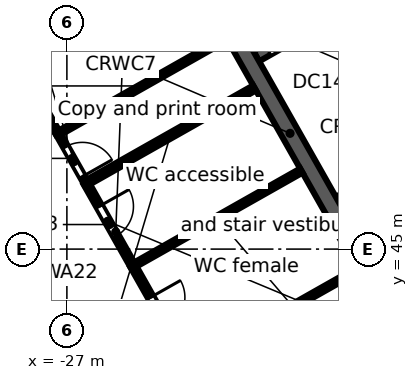
"""IFC4 building model, lengths in metres.
Left out: names, types, materials, properties, quantities, classifications, styles, units other than length and angle.
Written with IfcOpenShell. Run it as: python <this file> out.ifc"""

import sys

from ifc_helpers import new_model, si_unit, direction, frame, frame_2d, origin, place, context, subcontext, project, spatial, rectangle, extrude, element, fill, save


model = new_model("IFC4")
c1 = context("Model", 3, precision=1e-05, world=origin(), true_north=direction((0.0, 1.0)))
c2 = subcontext(c1, "Body", "Model", "MODEL_VIEW")
j1 = project(units=[si_unit("LENGTHUNIT", "METRE"), si_unit("PLANEANGLEUNIT", "RADIAN")], contexts=[c1])
p1 = place(None, origin())
s1 = spatial("IfcSite", under=j1, at=p1, CompositionType="ELEMENT")
p2 = place(p1, origin())
s2 = spatial("IfcBuilding", under=s1, at=p2, CompositionType="ELEMENT")
p3 = place(p2, frame((0.0, 0.0, 219.2)))
s3 = spatial("IfcBuildingStorey", under=s2, at=p3, CompositionType="ELEMENT", Elevation=219.2)
p4 = place(p3, frame((-0.046, 47.974, 0.0), z_axis=(0.0, 0.0, 1.0), x_axis=(-0.870356579543, -0.492421998337, 0.0)))
e1 = element("IfcWall", 1, at=p4, inside=s3, PredefinedType="STANDARD", context=c2, shape_type="SweptSolid", body=[
    extrude(rectangle(XDim=43.754, YDim=0.25, at=frame_2d((21.877, 0.0))), origin(), (0.0, 0.0, 1.0), 3.62),
])
p5 = place(p4, frame((41.061, 0.0, 0.8)))
e2 = element("IfcOpeningElement", 2, at=p5, cuts=e1, PredefinedType="OPENING", context=c2, shape_type="SweptSolid", body=[
    extrude(rectangle(XDim=2.4, YDim=2.2, at=frame_2d((1.2, 1.1))), frame((0.0, 0.135, 0.0), z_axis=(0.0, -1.0, 0.0), x_axis=(1.0, 0.0, 0.0)), (0.0, 0.0, 1.0), 0.27),
])
p6 = place(p4, frame((38.443, 0.0, 0.0)))
e3 = element("IfcOpeningElement", 3, at=p6, cuts=e1, PredefinedType="OPENING", context=c2, shape_type="SweptSolid", body=[
    extrude(rectangle(XDim=1.8, YDim=2.4, at=frame_2d((0.9, 1.2))), frame((0.0, 0.135, 0.0), z_axis=(0.0, -1.0, 0.0), x_axis=(1.0, 0.0, 0.0)), (0.0, 0.0, 1.0), 0.27),
])
p7 = place(p4, frame((35.225, 0.0, 0.8)))
e4 = element("IfcOpeningElement", 4, at=p7, cuts=e1, PredefinedType="OPENING", context=c2, shape_type="SweptSolid", body=[
    extrude(rectangle(XDim=2.4, YDim=2.2, at=frame_2d((1.2, 1.1))), frame((0.0, 0.135, 0.0), z_axis=(0.0, -1.0, 0.0), x_axis=(1.0, 0.0, 0.0)), (0.0, 0.0, 1.0), 0.27),
])
p8 = place(p4, frame((32.307, 0.0, 0.8)))
e5 = element("IfcOpeningElement", 5, at=p8, cuts=e1, PredefinedType="OPENING", context=c2, shape_type="SweptSolid", body=[
    extrude(rectangle(XDim=2.4, YDim=2.2, at=frame_2d((1.2, 1.1))), frame((0.0, 0.135, 0.0), z_axis=(0.0, -1.0, 0.0), x_axis=(1.0, 0.0, 0.0)), (0.0, 0.0, 1.0), 0.27),
])
p9 = place(p4, frame((29.688, 0.0, 0.0)))
e6 = element("IfcOpeningElement", 6, at=p9, cuts=e1, PredefinedType="OPENING", context=c2, shape_type="SweptSolid", body=[
    extrude(rectangle(XDim=1.8, YDim=2.4, at=frame_2d((0.9, 1.2))), frame((0.0, 0.135, 0.0), z_axis=(0.0, -1.0, 0.0), x_axis=(1.0, 0.0, 0.0)), (0.0, 0.0, 1.0), 0.27),
])
p10 = place(p4, frame((26.47, 0.0, 0.8)))
e7 = element("IfcOpeningElement", 7, at=p10, cuts=e1, PredefinedType="OPENING", context=c2, shape_type="SweptSolid", body=[
    extrude(rectangle(XDim=2.4, YDim=2.2, at=frame_2d((1.2, 1.1))), frame((0.0, 0.135, 0.0), z_axis=(0.0, -1.0, 0.0), x_axis=(1.0, 0.0, 0.0)), (0.0, 0.0, 1.0), 0.27),
])
p11 = place(p4, frame((23.552, 0.0, 0.8)))
e8 = element("IfcOpeningElement", 8, at=p11, cuts=e1, PredefinedType="OPENING", context=c2, shape_type="SweptSolid", body=[
    extrude(rectangle(XDim=2.4, YDim=2.2, at=frame_2d((1.2, 1.1))), frame((0.0, 0.135, 0.0), z_axis=(0.0, -1.0, 0.0), x_axis=(1.0, 0.0, 0.0)), (0.0, 0.0, 1.0), 0.27),
])
p12 = place(p4, frame((20.934, 0.0, 0.0)))
e9 = element("IfcOpeningElement", 9, at=p12, cuts=e1, PredefinedType="OPENING", context=c2, shape_type="SweptSolid", body=[
    extrude(rectangle(XDim=1.8, YDim=2.4, at=frame_2d((0.9, 1.2))), frame((0.0, 0.135, 0.0), z_axis=(0.0, -1.0, 0.0), x_axis=(1.0, 0.0, 0.0)), (0.0, 0.0, 1.0), 0.27),
])
p13 = place(p4, frame((17.716, 0.0, 0.8)))
e10 = element("IfcOpeningElement", 10, at=p13, cuts=e1, PredefinedType="OPENING", context=c2, shape_type="SweptSolid", body=[
    extrude(rectangle(XDim=2.4, YDim=2.2, at=frame_2d((1.2, 1.1))), frame((0.0, 0.135, 0.0), z_axis=(0.0, -1.0, 0.0), x_axis=(1.0, 0.0, 0.0)), (0.0, 0.0, 1.0), 0.27),
])
p14 = place(p4, frame((14.798, 0.0, 0.8)))
e11 = element("IfcOpeningElement", 11, at=p14, cuts=e1, PredefinedType="OPENING", context=c2, shape_type="SweptSolid", body=[
    extrude(rectangle(XDim=2.4, YDim=2.2, at=frame_2d((1.2, 1.1))), frame((0.0, 0.135, 0.0), z_axis=(0.0, -1.0, 0.0), x_axis=(1.0, 0.0, 0.0)), (0.0, 0.0, 1.0), 0.27),
])
p15 = place(p4, frame((12.179, 0.0, 0.0)))
e12 = element("IfcOpeningElement", 12, at=p15, cuts=e1, PredefinedType="OPENING", context=c2, shape_type="SweptSolid", body=[
    extrude(rectangle(XDim=1.8, YDim=2.4, at=frame_2d((0.9, 1.2))), frame((0.0, 0.135, 0.0), z_axis=(0.0, -1.0, 0.0), x_axis=(1.0, 0.0, 0.0)), (0.0, 0.0, 1.0), 0.27),
])
p16 = place(p4, frame((8.961, 0.0, 0.8)))
e13 = element("IfcOpeningElement", 13, at=p16, cuts=e1, PredefinedType="OPENING", context=c2, shape_type="SweptSolid", body=[
    extrude(rectangle(XDim=2.4, YDim=2.2, at=frame_2d((1.2, 1.1))), frame((0.0, 0.135, 0.0), z_axis=(0.0, -1.0, 0.0), x_axis=(1.0, 0.0, 0.0)), (0.0, 0.0, 1.0), 0.27),
])
p17 = place(p4, frame((6.043, 0.0, 0.8)))
e14 = element("IfcOpeningElement", 14, at=p17, cuts=e1, PredefinedType="OPENING", context=c2, shape_type="SweptSolid", body=[
    extrude(rectangle(XDim=2.4, YDim=2.2, at=frame_2d((1.2, 1.1))), frame((0.0, 0.135, 0.0), z_axis=(0.0, -1.0, 0.0), x_axis=(1.0, 0.0, 0.0)), (0.0, 0.0, 1.0), 0.27),
])
p18 = place(p4, frame((3.425, 0.0, 0.0)))
e15 = element("IfcOpeningElement", 15, at=p18, cuts=e1, PredefinedType="OPENING", context=c2, shape_type="SweptSolid", body=[
    extrude(rectangle(XDim=1.8, YDim=2.4, at=frame_2d((0.9, 1.2))), frame((0.0, 0.135, 0.0), z_axis=(0.0, -1.0, 0.0), x_axis=(1.0, 0.0, 0.0)), (0.0, 0.0, 1.0), 0.27),
])
p19 = place(p4, frame((0.207, 0.0, 0.8)))
e16 = element("IfcOpeningElement", 16, at=p19, cuts=e1, PredefinedType="OPENING", context=c2, shape_type="SweptSolid", body=[
    extrude(rectangle(XDim=2.4, YDim=2.2, at=frame_2d((1.2, 1.1))), frame((0.0, 0.135, 0.0), z_axis=(0.0, -1.0, 0.0), x_axis=(1.0, 0.0, 0.0)), (0.0, 0.0, 1.0), 0.27),
])
p20 = place(p3, frame((-58.732, 38.771, 0.0), z_axis=(0.0, 0.0, 1.0), x_axis=(0.870354824205, 0.492425100887, 0.0)))
e17 = element("IfcWall", 17, at=p20, inside=s3, PredefinedType="STANDARD", context=c2, shape_type="SweptSolid", body=[
    extrude(rectangle(XDim=64.006, YDim=0.25, at=frame_2d((32.003, 0.0))), origin(), (0.0, 0.0, 1.0), 3.62),
])
p21 = place(p20, frame((61.259, 0.0, 0.8)))
e18 = element("IfcOpeningElement", 18, at=p21, cuts=e17, PredefinedType="OPENING", context=c2, shape_type="SweptSolid", body=[
    extrude(rectangle(XDim=2.4, YDim=2.2, at=frame_2d((1.2, 1.1))), frame((0.0, 0.135, 0.0), z_axis=(0.0, -1.0, 0.0), x_axis=(1.0, 0.0, 0.0)), (0.0, 0.0, 1.0), 0.27),
])
p22 = place(p20, frame((58.216, 0.0, 0.8)))
e19 = element("IfcOpeningElement", 19, at=p22, cuts=e17, PredefinedType="OPENING", context=c2, shape_type="SweptSolid", body=[
    extrude(rectangle(XDim=2.4, YDim=2.2, at=frame_2d((1.2, 1.1))), frame((0.0, 0.135, 0.0), z_axis=(0.0, -1.0, 0.0), x_axis=(1.0, 0.0, 0.0)), (0.0, 0.0, 1.0), 0.27),
])
p23 = place(p20, frame((55.173, 0.0, 0.8)))
e20 = element("IfcOpeningElement", 20, at=p23, cuts=e17, PredefinedType="OPENING", context=c2, shape_type="SweptSolid", body=[
    extrude(rectangle(XDim=2.4, YDim=2.2, at=frame_2d((1.2, 1.1))), frame((0.0, 0.135, 0.0), z_axis=(0.0, -1.0, 0.0), x_axis=(1.0, 0.0, 0.0)), (0.0, 0.0, 1.0), 0.27),
])
p24 = place(p20, frame((52.129, 0.0, 0.8)))
e21 = element("IfcOpeningElement", 21, at=p24, cuts=e17, PredefinedType="OPENING", context=c2, shape_type="SweptSolid", body=[
    extrude(rectangle(XDim=2.4, YDim=2.2, at=frame_2d((1.2, 1.1))), frame((0.0, 0.135, 0.0), z_axis=(0.0, -1.0, 0.0), x_axis=(1.0, 0.0, 0.0)), (0.0, 0.0, 1.0), 0.27),
])
p25 = place(p20, frame((49.086, 0.0, 0.8)))
e22 = element("IfcOpeningElement", 22, at=p25, cuts=e17, PredefinedType="OPENING", context=c2, shape_type="SweptSolid", body=[
    extrude(rectangle(XDim=2.4, YDim=2.2, at=frame_2d((1.2, 1.1))), frame((0.0, 0.135, 0.0), z_axis=(0.0, -1.0, 0.0), x_axis=(1.0, 0.0, 0.0)), (0.0, 0.0, 1.0), 0.27),
])
p26 = place(p20, frame((46.043, 0.0, 0.8)))
e23 = element("IfcOpeningElement", 23, at=p26, cuts=e17, PredefinedType="OPENING", context=c2, shape_type="SweptSolid", body=[
    extrude(rectangle(XDim=2.4, YDim=2.2, at=frame_2d((1.2, 1.1))), frame((0.0, 0.135, 0.0), z_axis=(0.0, -1.0, 0.0), x_axis=(1.0, 0.0, 0.0)), (0.0, 0.0, 1.0), 0.27),
])
p27 = place(p20, frame((43.0, 0.0, 0.8)))
e24 = element("IfcOpeningElement", 24, at=p27, cuts=e17, PredefinedType="OPENING", context=c2, shape_type="SweptSolid", body=[
    extrude(rectangle(XDim=2.4, YDim=2.2, at=frame_2d((1.2, 1.1))), frame((0.0, 0.135, 0.0), z_axis=(0.0, -1.0, 0.0), x_axis=(1.0, 0.0, 0.0)), (0.0, 0.0, 1.0), 0.27),
])
p28 = place(p20, frame((39.956, 0.0, 0.8)))
e25 = element("IfcOpeningElement", 25, at=p28, cuts=e17, PredefinedType="OPENING", context=c2, shape_type="SweptSolid", body=[
    extrude(rectangle(XDim=2.4, YDim=2.2, at=frame_2d((1.2, 1.1))), frame((0.0, 0.135, 0.0), z_axis=(0.0, -1.0, 0.0), x_axis=(1.0, 0.0, 0.0)), (0.0, 0.0, 1.0), 0.27),
])
p29 = place(p20, frame((36.913, 0.0, 0.8)))
e26 = element("IfcOpeningElement", 26, at=p29, cuts=e17, PredefinedType="OPENING", context=c2, shape_type="SweptSolid", body=[
    extrude(rectangle(XDim=2.4, YDim=2.2, at=frame_2d((1.2, 1.1))), frame((0.0, 0.135, 0.0), z_axis=(0.0, -1.0, 0.0), x_axis=(1.0, 0.0, 0.0)), (0.0, 0.0, 1.0), 0.27),
])
p30 = place(p20, frame((33.87, 0.0, 0.8)))
e27 = element("IfcOpeningElement", 27, at=p30, cuts=e17, PredefinedType="OPENING", context=c2, shape_type="SweptSolid", body=[
    extrude(rectangle(XDim=2.4, YDim=2.2, at=frame_2d((1.2, 1.1))), frame((0.0, 0.135, 0.0), z_axis=(0.0, -1.0, 0.0), x_axis=(1.0, 0.0, 0.0)), (0.0, 0.0, 1.0), 0.27),
])
p31 = place(p20, frame((30.826, 0.0, 0.8)))
e28 = element("IfcOpeningElement", 28, at=p31, cuts=e17, PredefinedType="OPENING", context=c2, shape_type="SweptSolid", body=[
    extrude(rectangle(XDim=2.4, YDim=2.2, at=frame_2d((1.2, 1.1))), frame((0.0, 0.135, 0.0), z_axis=(0.0, -1.0, 0.0), x_axis=(1.0, 0.0, 0.0)), (0.0, 0.0, 1.0), 0.27),
])
p32 = place(p20, frame((27.783, 0.0, 0.8)))
e29 = element("IfcOpeningElement", 29, at=p32, cuts=e17, PredefinedType="OPENING", context=c2, shape_type="SweptSolid", body=[
    extrude(rectangle(XDim=2.4, YDim=2.2, at=frame_2d((1.2, 1.1))), frame((0.0, 0.135, 0.0), z_axis=(0.0, -1.0, 0.0), x_axis=(1.0, 0.0, 0.0)), (0.0, 0.0, 1.0), 0.27),
])
p33 = place(p20, frame((24.74, 0.0, 0.8)))
e30 = element("IfcOpeningElement", 30, at=p33, cuts=e17, PredefinedType="OPENING", context=c2, shape_type="SweptSolid", body=[
    extrude(rectangle(XDim=2.4, YDim=2.2, at=frame_2d((1.2, 1.1))), frame((0.0, 0.135, 0.0), z_axis=(0.0, -1.0, 0.0), x_axis=(1.0, 0.0, 0.0)), (0.0, 0.0, 1.0), 0.27),
])
p34 = place(p20, frame((21.696, 0.0, 0.8)))
e31 = element("IfcOpeningElement", 31, at=p34, cuts=e17, PredefinedType="OPENING", context=c2, shape_type="SweptSolid", body=[
    extrude(rectangle(XDim=2.4, YDim=2.2, at=frame_2d((1.2, 1.1))), frame((0.0, 0.135, 0.0), z_axis=(0.0, -1.0, 0.0), x_axis=(1.0, 0.0, 0.0)), (0.0, 0.0, 1.0), 0.27),
])
p35 = place(p20, frame((18.653, 0.0, 0.8)))
e32 = element("IfcOpeningElement", 32, at=p35, cuts=e17, PredefinedType="OPENING", context=c2, shape_type="SweptSolid", body=[
    extrude(rectangle(XDim=2.4, YDim=2.2, at=frame_2d((1.2, 1.1))), frame((0.0, 0.135, 0.0), z_axis=(0.0, -1.0, 0.0), x_axis=(1.0, 0.0, 0.0)), (0.0, 0.0, 1.0), 0.27),
])
p36 = place(p20, frame((15.61, 0.0, 0.8)))
e33 = element("IfcOpeningElement", 33, at=p36, cuts=e17, PredefinedType="OPENING", context=c2, shape_type="SweptSolid", body=[
    extrude(rectangle(XDim=2.4, YDim=2.2, at=frame_2d((1.2, 1.1))), frame((0.0, 0.135, 0.0), z_axis=(0.0, -1.0, 0.0), x_axis=(1.0, 0.0, 0.0)), (0.0, 0.0, 1.0), 0.27),
])
p37 = place(p20, frame((12.567, 0.0, 0.8)))
e34 = element("IfcOpeningElement", 34, at=p37, cuts=e17, PredefinedType="OPENING", context=c2, shape_type="SweptSolid", body=[
    extrude(rectangle(XDim=2.4, YDim=2.2, at=frame_2d((1.2, 1.1))), frame((0.0, 0.135, 0.0), z_axis=(0.0, -1.0, 0.0), x_axis=(1.0, 0.0, 0.0)), (0.0, 0.0, 1.0), 0.27),
])
p38 = place(p20, frame((9.523, 0.0, 0.8)))
e35 = element("IfcOpeningElement", 35, at=p38, cuts=e17, PredefinedType="OPENING", context=c2, shape_type="SweptSolid", body=[
    extrude(rectangle(XDim=2.4, YDim=2.2, at=frame_2d((1.2, 1.1))), frame((0.0, 0.135, 0.0), z_axis=(0.0, -1.0, 0.0), x_axis=(1.0, 0.0, 0.0)), (0.0, 0.0, 1.0), 0.27),
])
p39 = place(p20, frame((6.48, 0.0, 0.8)))
e36 = element("IfcOpeningElement", 36, at=p39, cuts=e17, PredefinedType="OPENING", context=c2, shape_type="SweptSolid", body=[
    extrude(rectangle(XDim=2.4, YDim=2.2, at=frame_2d((1.2, 1.1))), frame((0.0, 0.135, 0.0), z_axis=(0.0, -1.0, 0.0), x_axis=(1.0, 0.0, 0.0)), (0.0, 0.0, 1.0), 0.27),
])
p40 = place(p20, frame((3.437, 0.0, 0.8)))
e37 = element("IfcOpeningElement", 37, at=p40, cuts=e17, PredefinedType="OPENING", context=c2, shape_type="SweptSolid", body=[
    extrude(rectangle(XDim=2.4, YDim=2.2, at=frame_2d((1.2, 1.1))), frame((0.0, 0.135, 0.0), z_axis=(0.0, -1.0, 0.0), x_axis=(1.0, 0.0, 0.0)), (0.0, 0.0, 1.0), 0.27),
])
p41 = place(p20, frame((0.393, 0.0, 0.8)))
e38 = element("IfcOpeningElement", 38, at=p41, cuts=e17, PredefinedType="OPENING", context=c2, shape_type="SweptSolid", body=[
    extrude(rectangle(XDim=2.4, YDim=2.2, at=frame_2d((1.2, 1.1))), frame((0.0, 0.135, 0.0), z_axis=(0.0, -1.0, 0.0), x_axis=(1.0, 0.0, 0.0)), (0.0, 0.0, 1.0), 0.27),
])
p42 = place(p3, frame((-31.787, 49.542, 0.0), z_axis=(0.0, 0.0, 1.0), x_axis=(0.492421378713, -0.870356930107, 0.0)))
e39 = element("IfcWall", 39, at=p42, inside=s3, PredefinedType="SOLIDWALL", context=c2, shape_type="SweptSolid", body=[
    extrude(rectangle(XDim=13.1, YDim=0.45, at=frame_2d((6.55, 0.0))), origin(), (0.0, 0.0, 1.0), 3.62),
])
p43 = place(p3, frame((-19.849, 46.242, 0.0), z_axis=(0.0, 0.0, 1.0), x_axis=(0.870347559728, 0.492437940532, 0.0)))
e40 = element("IfcWall", 40, at=p43, inside=s3, PredefinedType="SOLIDWALL", context=c2, shape_type="SweptSolid", body=[
    extrude(rectangle(XDim=5.05, YDim=0.3, at=frame_2d((2.525, 0.0))), origin(), (0.0, 0.0, 1.0), 3.62),
])
p44 = place(p43, frame((0.7, 0.0, 0.0)))
e41 = element("IfcOpeningElement", 41, at=p44, cuts=e40, PredefinedType="OPENING", context=c2, shape_type="SweptSolid", body=[
    extrude(rectangle(XDim=1.1, YDim=2.1, at=frame_2d((0.55, 1.05))), frame((0.0, 0.16, 0.0), z_axis=(0.0, -1.0, 0.0), x_axis=(1.0, 0.0, 0.0)), (0.0, 0.0, 1.0), 0.32),
])
p45 = place(p43, frame((3.0, 0.0, 0.0)))
e42 = element("IfcOpeningElement", 42, at=p45, cuts=e40, PredefinedType="OPENING", context=c2, shape_type="SweptSolid", body=[
    extrude(rectangle(XDim=0.9, YDim=2.1, at=frame_2d((0.45, 1.05))), frame((0.0, 0.16, 0.0), z_axis=(0.0, -1.0, 0.0), x_axis=(1.0, 0.0, 0.0)), (0.0, 0.0, 1.0), 0.32),
])
p46 = place(p3, frame((-22.015, 50.072, 0.0), z_axis=(0.0, 0.0, 1.0), x_axis=(0.870354900257, 0.492424966466, 0.0)))
e43 = element("IfcWall", 43, at=p46, inside=s3, PredefinedType="SOLIDWALL", context=c2, shape_type="SweptSolid", body=[
    extrude(rectangle(XDim=7.35, YDim=0.3, at=frame_2d((3.675, 0.0))), origin(), (0.0, 0.0, 1.0), 3.62),
])
p47 = place(p46, frame((0.35, 0.0, 0.0)))
e44 = element("IfcOpeningElement", 44, at=p47, cuts=e43, PredefinedType="OPENING", context=c2, shape_type="SweptSolid", body=[
    extrude(rectangle(XDim=1.0, YDim=2.1, at=frame_2d((0.5, 1.05))), frame((0.0, 0.16, 0.0), z_axis=(0.0, -1.0, 0.0), x_axis=(1.0, 0.0, 0.0)), (0.0, 0.0, 1.0), 0.32),
])
p48 = place(p3, frame((-24.353, 53.747, 0.0), z_axis=(0.0, 0.0, 1.0), x_axis=(0.492435496286, -0.870348942665, 0.0)))
e45 = element("IfcWall", 45, at=p48, inside=s3, PredefinedType="SOLIDWALL", context=c2, shape_type="SweptSolid", body=[
    extrude(rectangle(XDim=13.1, YDim=0.45, at=frame_2d((6.55, 0.0))), origin(), (0.0, 0.0, 1.0), 3.62),
])
p49 = place(p3, frame((-29.201, 51.521, 0.0), z_axis=(0.0, 0.0, 1.0), x_axis=(0.492340861121, -0.870402479587, 0.0)))
e46 = element("IfcWall", 46, at=p49, inside=s3, PredefinedType="PARTITIONING", context=c2, shape_type="SweptSolid", body=[
    extrude(rectangle(XDim=3.999, YDim=0.125, at=frame_2d((2.0, 0.0))), origin(), (0.0, 0.0, 1.0), 3.62),
])
p50 = place(p49, frame((1.45, 0.0, 0.0)))
e47 = element("IfcOpeningElement", 47, at=p50, cuts=e46, PredefinedType="OPENING", context=c2, shape_type="SweptSolid", body=[
    extrude(rectangle(XDim=0.9, YDim=2.1, at=frame_2d((0.45, 1.05))), frame((0.0, 0.073, 0.0), z_axis=(0.0, -1.0, 0.0), x_axis=(1.0, 0.0, 0.0)), (0.0, 0.0, 1.0), 0.145),
])
p51 = place(p3, frame((-27.232, 48.04, 0.0), z_axis=(0.0, 0.0, 1.0), x_axis=(0.492437810475, -0.870347633314, 0.0)))
e48 = element("IfcWall", 48, at=p51, inside=s3, PredefinedType="PARTITIONING", context=c2, shape_type="SweptSolid", body=[
    extrude(rectangle(XDim=1.501, YDim=0.125, at=frame_2d((0.75, 0.0))), origin(), (0.0, 0.0, 1.0), 3.62),
])
p52 = place(p51, frame((0.4, 0.0, 0.0)))
e49 = element("IfcOpeningElement", 49, at=p52, cuts=e48, PredefinedType="OPENING", context=c2, shape_type="SweptSolid", body=[
    extrude(rectangle(XDim=0.9, YDim=2.1, at=frame_2d((0.45, 1.05))), frame((0.0, 0.073, 0.0), z_axis=(0.0, -1.0, 0.0), x_axis=(1.0, 0.0, 0.0)), (0.0, 0.0, 1.0), 0.145),
])
p53 = place(p3, frame((-27.232, 48.04, 0.0), z_axis=(0.0, 0.0, 1.0), x_axis=(0.870339461844, 0.492452252668, 0.0)))
e50 = element("IfcWall", 50, at=p53, inside=s3, PredefinedType="PARTITIONING", context=c2, shape_type="SweptSolid", body=[
    extrude(rectangle(XDim=5.091, YDim=0.125, at=frame_2d((2.545, 0.0))), origin(), (0.0, 0.0, 1.0), 2.892),
])
p54 = place(p3, frame((-26.493, 46.734, 0.0), z_axis=(0.0, 0.0, 1.0), x_axis=(0.49257867544, -0.870267917656, 0.0)))
e51 = element("IfcWall", 51, at=p54, inside=s3, PredefinedType="PARTITIONING", context=c2, shape_type="SweptSolid", body=[
    extrude(rectangle(XDim=2.499, YDim=0.15, at=frame_2d((1.25, 0.0))), origin(), (0.0, 0.0, 1.0), 2.892),
])
p55 = place(p54, frame((0.7, 0.0, 0.0)))
e52 = element("IfcOpeningElement", 52, at=p55, cuts=e51, PredefinedType="OPENING", context=c2, shape_type="SweptSolid", body=[
    extrude(rectangle(XDim=0.9, YDim=2.1, at=frame_2d((0.45, 1.05))), frame((0.0, 0.085, 0.0), z_axis=(0.0, -1.0, 0.0), x_axis=(1.0, 0.0, 0.0)), (0.0, 0.0, 1.0), 0.17),
])
p56 = place(p3, frame((-26.493, 46.734, 0.0), z_axis=(0.0, 0.0, 1.0), x_axis=(0.870339461844, 0.492452252668, 0.0)))
e53 = element("IfcWall", 53, at=p56, inside=s3, PredefinedType="PARTITIONING", context=c2, shape_type="SweptSolid", body=[
    extrude(rectangle(XDim=5.091, YDim=0.15, at=frame_2d((2.545, 0.0))), origin(), (0.0, 0.0, 1.0), 2.892),
])
p57 = place(p3, frame((-25.262, 44.559, 0.0), z_axis=(0.0, 0.0, 1.0), x_axis=(0.492226144536, -0.870467358742, 0.0)))
e54 = element("IfcWall", 54, at=p57, inside=s3, PredefinedType="PARTITIONING", context=c2, shape_type="SweptSolid", body=[
    extrude(rectangle(XDim=3.001, YDim=0.15, at=frame_2d((1.5, 0.0))), origin(), (0.0, 0.0, 1.0), 3.62),
])
p58 = place(p57, frame((0.95, 0.0, 0.0)))
e55 = element("IfcOpeningElement", 55, at=p58, cuts=e54, PredefinedType="OPENING", context=c2, shape_type="SweptSolid", body=[
    extrude(rectangle(XDim=0.9, YDim=2.1, at=frame_2d((0.45, 1.05))), frame((0.0, 0.085, 0.0), z_axis=(0.0, -1.0, 0.0), x_axis=(1.0, 0.0, 0.0)), (0.0, 0.0, 1.0), 0.17),
])
p59 = place(p3, frame((-25.262, 44.559, 0.0), z_axis=(0.0, 0.0, 1.0), x_axis=(0.870442223229, 0.492270592276, 0.0)))
e56 = element("IfcWall", 56, at=p59, inside=s3, PredefinedType="PARTITIONING", context=c2, shape_type="SweptSolid", body=[
    extrude(rectangle(XDim=5.09, YDim=0.125, at=frame_2d((2.545, 0.0))), origin(), (0.0, 0.0, 1.0), 3.62),
])
p60 = place(p3, frame((-23.785, 41.947, 0.0), z_axis=(0.0, 0.0, 1.0), x_axis=(0.870339461844, 0.492452252668, 0.0)))
e57 = element("IfcWall", 57, at=p60, inside=s3, PredefinedType="PARTITIONING", context=c2, shape_type="SweptSolid", body=[
    extrude(rectangle(XDim=5.091, YDim=0.125, at=frame_2d((2.545, 0.0))), origin(), (0.0, 0.0, 1.0), 3.62),
])
p61 = place(p58, origin())
e58 = element("IfcDoor", 58, at=p61, inside=s3, OperationType="SINGLE_SWING_LEFT", PredefinedType="DOOR", context=c2, shape_type="SweptSolid", body=[
    extrude(rectangle(XDim=0.9, YDim=2.1, at=frame_2d((0.45, 1.05))), frame((0.0, 0.025, 0.0), z_axis=(0.0, -1.0, 0.0), x_axis=(1.0, 0.0, 0.0)), (0.0, 0.0, 1.0), 0.05),
])
fill(e55, e58)
p62 = place(p55, origin())
e59 = element("IfcDoor", 59, at=p62, inside=s3, OperationType="SINGLE_SWING_LEFT", PredefinedType="DOOR", context=c2, shape_type="SweptSolid", body=[
    extrude(rectangle(XDim=0.9, YDim=2.1, at=frame_2d((0.45, 1.05))), frame((0.0, 0.025, 0.0), z_axis=(0.0, -1.0, 0.0), x_axis=(1.0, 0.0, 0.0)), (0.0, 0.0, 1.0), 0.05),
])
fill(e52, e59)
p63 = place(p52, origin())
e60 = element("IfcDoor", 60, at=p63, inside=s3, OperationType="SINGLE_SWING_RIGHT", PredefinedType="DOOR", context=c2, shape_type="SweptSolid", body=[
    extrude(rectangle(XDim=0.9, YDim=2.1, at=frame_2d((0.45, 1.05))), frame((0.0, 0.025, 0.0), z_axis=(0.0, -1.0, 0.0), x_axis=(1.0, 0.0, 0.0)), (0.0, 0.0, 1.0), 0.05),
])
fill(e49, e60)
save(model, sys.argv[1])
